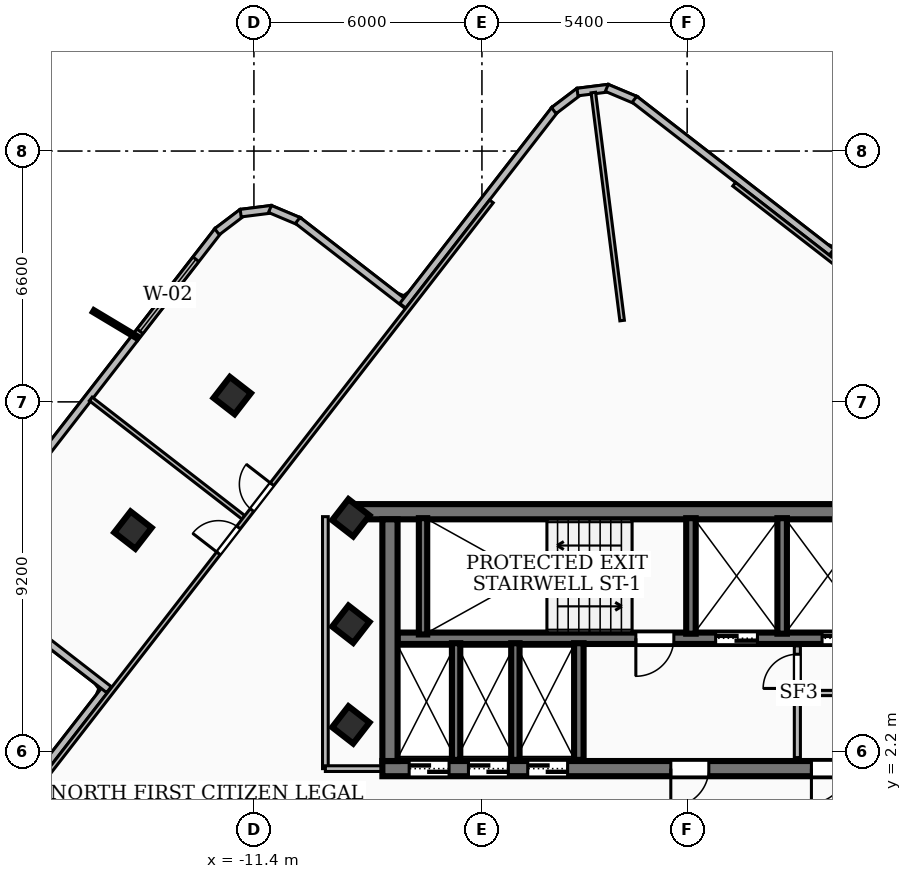
"""IFC4 building model, lengths in metres.
Left out: names, types, materials, properties, quantities, classifications, styles, units other than length and angle.
Written with IfcOpenShell. Run it as: python <this file> out.ifc"""

import sys

from ifc_helpers import new_model, si_unit, direction, frame, frame_2d, origin, origin_2d, place, context, subcontext, project, spatial, rectangle, extrude, element, fill, save


model = new_model("IFC4")
c1 = context("Model", 3, precision=1e-05, world=origin(), true_north=direction((0.0, 1.0)))
c2 = subcontext(c1, "Body", "Model", "MODEL_VIEW")
j1 = project(units=[si_unit("LENGTHUNIT", "METRE"), si_unit("PLANEANGLEUNIT", "RADIAN")], contexts=[c1])
p1 = place(None, origin())
s1 = spatial("IfcSite", under=j1, at=p1, CompositionType="ELEMENT")
p2 = place(p1, origin())
s2 = spatial("IfcBuilding", under=s1, at=p2, CompositionType="ELEMENT")
p3 = place(p2, frame((0.0, 0.0, 257.76)))
s3 = spatial("IfcBuildingStorey", under=s2, at=p3, CompositionType="ELEMENT", Elevation=257.76)
p4 = place(p3, frame((-8.78, 8.51, 0.0), z_axis=(0.0, 0.0, 1.0), x_axis=(1.0, 0.0, 0.0)))
e1 = element("IfcWall", 1, at=p4, inside=s3, PredefinedType="SHEAR", context=c2, shape_type="SweptSolid", body=[
    extrude(rectangle(XDim=17.56, YDim=0.4, at=frame_2d((8.78, 0.0))), origin(), (0.0, 0.0, 1.0), 3.16),
])
p5 = place(p3, frame((8.02, 1.75, 0.0), z_axis=(0.0, 0.0, 1.0), x_axis=(-1.0, 0.0, 0.0)))
e2 = element("IfcWall", 2, at=p5, inside=s3, PredefinedType="SHEAR", context=c2, shape_type="SweptSolid", body=[
    extrude(rectangle(XDim=16.04, YDim=0.4, at=frame_2d((8.02, 0.0))), origin(), (0.0, 0.0, 1.0), 3.16),
])
p6 = place(p5, frame((7.45, 0.0, 0.0)))
e3 = element("IfcOpeningElement", 3, at=p6, cuts=e2, PredefinedType="OPENING", context=c2, shape_type="SweptSolid", body=[
    extrude(rectangle(XDim=1.0, YDim=2.1, at=frame_2d((0.5, 1.05))), frame((0.0, 0.21, 0.0), z_axis=(0.0, -1.0, 0.0), x_axis=(1.0, 0.0, 0.0)), (0.0, 0.0, 1.0), 0.42),
])
p7 = place(p5, frame((14.285, 0.0, 0.0)))
e4 = element("IfcOpeningElement", 4, at=p7, cuts=e2, PredefinedType="OPENING", context=c2, shape_type="SweptSolid", body=[
    extrude(rectangle(XDim=1.05, YDim=2.15, at=frame_2d((0.525, 1.075))), frame((0.0, 0.21, 0.0), z_axis=(0.0, -1.0, 0.0), x_axis=(1.0, 0.0, 0.0)), (0.0, 0.0, 1.0), 0.42),
])
p8 = place(p5, frame((12.725, 0.0, 0.0)))
e5 = element("IfcOpeningElement", 5, at=p8, cuts=e2, PredefinedType="OPENING", context=c2, shape_type="SweptSolid", body=[
    extrude(rectangle(XDim=1.05, YDim=2.15, at=frame_2d((0.525, 1.075))), frame((0.0, 0.21, 0.0), z_axis=(0.0, -1.0, 0.0), x_axis=(1.0, 0.0, 0.0)), (0.0, 0.0, 1.0), 0.42),
])
p9 = place(p5, frame((11.165, 0.0, 0.0)))
e6 = element("IfcOpeningElement", 6, at=p9, cuts=e2, PredefinedType="OPENING", context=c2, shape_type="SweptSolid", body=[
    extrude(rectangle(XDim=1.05, YDim=2.15, at=frame_2d((0.525, 1.075))), frame((0.0, 0.21, 0.0), z_axis=(0.0, -1.0, 0.0), x_axis=(1.0, 0.0, 0.0)), (0.0, 0.0, 1.0), 0.42),
])
p10 = place(p5, frame((3.85, 0.0, 0.0)))
e7 = element("IfcOpeningElement", 7, at=p10, cuts=e2, PredefinedType="OPENING", context=c2, shape_type="SweptSolid", body=[
    extrude(rectangle(XDim=0.9, YDim=2.06, at=frame_2d((0.45, 1.03))), frame((0.0, 0.21, 0.0), z_axis=(0.0, -1.0, 0.0), x_axis=(1.0, 0.0, 0.0)), (0.0, 0.0, 1.0), 0.42),
])
p11 = place(p5, frame((2.35, 0.0, 0.0)))
e8 = element("IfcOpeningElement", 8, at=p11, cuts=e2, PredefinedType="OPENING", context=c2, shape_type="SweptSolid", body=[
    extrude(rectangle(XDim=0.9, YDim=2.06, at=frame_2d((0.45, 1.03))), frame((0.0, 0.21, 0.0), z_axis=(0.0, -1.0, 0.0), x_axis=(1.0, 0.0, 0.0)), (0.0, 0.0, 1.0), 0.42),
])
p12 = place(p5, frame((0.8, 0.0, 0.0)))
e9 = element("IfcOpeningElement", 9, at=p12, cuts=e2, PredefinedType="OPENING", context=c2, shape_type="SweptSolid", body=[
    extrude(rectangle(XDim=0.9, YDim=2.06, at=frame_2d((0.45, 1.03))), frame((0.0, 0.21, 0.0), z_axis=(0.0, -1.0, 0.0), x_axis=(1.0, 0.0, 0.0)), (0.0, 0.0, 1.0), 0.42),
])
p13 = place(p3, frame((-7.82, 1.95, 0.0), z_axis=(0.0, 0.0, 1.0), x_axis=(0.0, 1.0, 0.0)))
e10 = element("IfcWall", 10, at=p13, inside=s3, PredefinedType="SHEAR", context=c2, shape_type="SweptSolid", body=[
    extrude(rectangle(XDim=6.36, YDim=0.4, at=frame_2d((3.18, 0.0))), origin(), (0.0, 0.0, 1.0), 3.16),
])
p14 = place(p3, frame((7.62, 5.18, 0.0), z_axis=(0.0, 0.0, 1.0), x_axis=(-1.0, 0.0, 0.0)))
e11 = element("IfcWall", 11, at=p14, inside=s3, PredefinedType="SOLIDWALL", context=c2, shape_type="SweptSolid", body=[
    extrude(rectangle(XDim=15.24, YDim=0.3, at=frame_2d((7.62, 0.0))), origin(), (0.0, 0.0, 1.0), 3.16),
])
p15 = place(p14, frame((5.77, 0.0, 0.0)))
e12 = element("IfcOpeningElement", 12, at=p15, cuts=e11, PredefinedType="OPENING", context=c2, shape_type="SweptSolid", body=[
    extrude(rectangle(XDim=1.1, YDim=2.15, at=frame_2d((0.55, 1.075))), frame((0.0, 0.16, 0.0), z_axis=(0.0, -1.0, 0.0), x_axis=(1.0, 0.0, 0.0)), (0.0, 0.0, 1.0), 0.32),
])
p16 = place(p14, frame((2.97, 0.0, 0.0)))
e13 = element("IfcOpeningElement", 13, at=p16, cuts=e11, PredefinedType="OPENING", context=c2, shape_type="SweptSolid", body=[
    extrude(rectangle(XDim=1.1, YDim=2.15, at=frame_2d((0.55, 1.075))), frame((0.0, 0.16, 0.0), z_axis=(0.0, -1.0, 0.0), x_axis=(1.0, 0.0, 0.0)), (0.0, 0.0, 1.0), 0.32),
])
p17 = place(p14, frame((7.97, 0.0, 0.0)))
e14 = element("IfcOpeningElement", 14, at=p17, cuts=e11, PredefinedType="OPENING", context=c2, shape_type="SweptSolid", body=[
    extrude(rectangle(XDim=1.0, YDim=2.1, at=frame_2d((0.5, 1.05))), frame((0.0, 0.16, 0.0), z_axis=(0.0, -1.0, 0.0), x_axis=(1.0, 0.0, 0.0)), (0.0, 0.0, 1.0), 0.32),
])
p18 = place(p3, frame((-6.95, 5.28, 0.0), z_axis=(0.0, 0.0, 1.0), x_axis=(0.0, 1.0, 0.0)))
e15 = element("IfcWall", 15, at=p18, inside=s3, PredefinedType="SOLIDWALL", context=c2, shape_type="SweptSolid", body=[
    extrude(rectangle(XDim=3.06, YDim=0.22, at=frame_2d((1.53, 0.0))), origin(), (0.0, 0.0, 1.0), 3.16),
])
for number, where, z_axis, x_axis in (
    (16, (0.1, 5.3, 0.0), (0.0, 0.0, 1.0), (0.0, 1.0, 0.0)),
    (17, (2.5, 5.3, 0.0), (0.0, 0.0, 1.0), (0.0, 1.0, 0.0)),
):
    element("IfcWall", number, at=place(p3, frame(where, z_axis=z_axis, x_axis=x_axis)), inside=s3, PredefinedType="SOLIDWALL", context=c2, shape_type="SweptSolid", body=[
        extrude(rectangle(XDim=3.04, YDim=0.25, at=frame_2d((1.52, 0.0))), origin(), (0.0, 0.0, 1.0), 3.16),
    ])
p19 = place(p3, frame((-2.85, 1.98, 0.0), z_axis=(0.0, 0.0, 1.0), x_axis=(0.0, 1.0, 0.0)))
e18 = element("IfcWall", 18, at=p19, inside=s3, PredefinedType="SOLIDWALL", context=c2, shape_type="SweptSolid", body=[
    extrude(rectangle(XDim=3.07, YDim=0.25, at=frame_2d((1.535, 0.0))), origin(), (0.0, 0.0, 1.0), 3.16),
])
for number, where, z_axis, x_axis in (
    (19, (-6.08, 1.98, 0.0), (0.0, 0.0, 1.0), (0.0, 1.0, 0.0)),
    (20, (-4.52, 1.98, 0.0), (0.0, 0.0, 1.0), (0.0, 1.0, 0.0)),
):
    element("IfcWall", number, at=place(p3, frame(where, z_axis=z_axis, x_axis=x_axis)), inside=s3, PredefinedType="SOLIDWALL", context=c2, shape_type="SweptSolid", body=[
        extrude(rectangle(XDim=3.07, YDim=0.22, at=frame_2d((1.535, 0.0))), origin(), (0.0, 0.0, 1.0), 3.16),
    ])
for number, where, z_axis, x_axis in (
    (21, (-8.85, 2.9, 0.0), (0.0, 0.0, 1.0), (0.613, 0.79, 0.0)),
    (22, (-8.85, 5.55, 0.0), (0.0, 0.0, 1.0), (0.613, 0.79, 0.0)),
    (23, (-8.85, 8.35, 0.0), (0.0, 0.0, 1.0), (0.613, 0.79, 0.0)),
    (24, (-11.971, 11.566, 0.0), (0.0, 0.0, 1.0), (0.613, 0.79, 0.0)),
    (25, (-14.583, 8.026, 0.0), (0.0, 0.0, 1.0), (0.613, 0.79, 0.0)),
):
    element("IfcColumn", number, at=place(p3, frame(where, z_axis=z_axis, x_axis=x_axis)), inside=s3, PredefinedType="COLUMN", context=c2, shape_type="SweptSolid", body=[
        extrude(rectangle(XDim=0.7, YDim=0.7, at=origin_2d()), origin(), (0.0, 0.0, 1.0), 3.42),
    ])
p20 = place(p3, frame((-19.362, -1.386, 0.0), z_axis=(0.0, 0.0, 1.0), x_axis=(0.613007625303, 0.790076990755, 0.0)))
e26 = element("IfcWall", 26, at=p20, inside=s3, PredefinedType="SOLIDWALL", context=c2, shape_type="SweptSolid", body=[
    extrude(rectangle(XDim=6.742, YDim=0.2, at=frame_2d((3.371, 0.0))), origin(), (0.0, 0.0, 1.0), 3.16),
])
p21 = place(p3, frame((-15.215, 3.829, 0.0), z_axis=(0.0, 0.0, 1.0), x_axis=(-0.790311198889, 0.612705646221, 0.0)))
e27 = element("IfcWall", 27, at=p21, inside=s3, PredefinedType="SOLIDWALL", context=c2, shape_type="SweptSolid", body=[
    extrude(rectangle(XDim=3.643, YDim=0.2, at=frame_2d((1.821, 0.0))), origin(), (0.0, 0.0, 1.0), 3.16),
])
p22 = place(p3, frame((-18.357, 8.149, 0.0), z_axis=(0.0, 0.0, 1.0), x_axis=(0.612797548915, 0.790239940806, 0.0)))
e28 = element("IfcWall", 28, at=p22, inside=s3, PredefinedType="SOLIDWALL", context=c2, shape_type="SweptSolid", body=[
    extrude(rectangle(XDim=9.824, YDim=0.2, at=frame_2d((4.912, 0.0))), origin(), (0.0, 0.0, 1.0), 3.16),
])
p23 = place(p22, frame((6.462, 0.0, 0.85)))
e29 = element("IfcOpeningElement", 29, at=p23, cuts=e28, PredefinedType="OPENING", context=c2, shape_type="SweptSolid", body=[
    extrude(rectangle(XDim=2.4, YDim=2.1, at=frame_2d((1.2, 1.05))), frame((0.0, 0.11, 0.0), z_axis=(0.0, -1.0, 0.0), x_axis=(1.0, 0.0, 0.0)), (0.0, 0.0, 1.0), 0.22),
])
p24 = place(p3, frame((-12.372, 15.877, 0.0), z_axis=(0.0, 0.0, 1.0), x_axis=(0.796493049564, 0.60464768419, 0.0)))
e30 = element("IfcWall", 30, at=p24, inside=s3, PredefinedType="SOLIDWALL", context=c2, shape_type="SweptSolid", body=[
    extrude(rectangle(XDim=0.839, YDim=0.2, at=frame_2d((0.419, 0.0))), origin(), (0.0, 0.0, 1.0), 3.16),
])
p25 = place(p3, frame((-11.749, 16.366, 0.0), z_axis=(0.0, 0.0, 1.0), x_axis=(0.992182038023, 0.124799052175, 0.0)))
e31 = element("IfcWall", 31, at=p25, inside=s3, PredefinedType="SOLIDWALL", context=c2, shape_type="SweptSolid", body=[
    extrude(rectangle(XDim=0.825, YDim=0.2, at=frame_2d((0.413, 0.0))), origin(), (0.0, 0.0, 1.0), 3.16),
])
p26 = place(p3, frame((-10.978, 16.476, 0.0), z_axis=(0.0, 0.0, 1.0), x_axis=(0.921328331513, -0.388785423532, 0.0)))
e32 = element("IfcWall", 32, at=p26, inside=s3, PredefinedType="SOLIDWALL", context=c2, shape_type="SweptSolid", body=[
    extrude(rectangle(XDim=0.839, YDim=0.2, at=frame_2d((0.419, 0.0))), origin(), (0.0, 0.0, 1.0), 3.16),
])
p27 = place(p3, frame((-10.248, 16.175, 0.0), z_axis=(0.0, 0.0, 1.0), x_axis=(0.790239683444, -0.612797880797, 0.0)))
e33 = element("IfcWall", 33, at=p27, inside=s3, PredefinedType="SOLIDWALL", context=c2, shape_type="SweptSolid", body=[
    extrude(rectangle(XDim=3.641, YDim=0.2, at=frame_2d((1.82, 0.0))), origin(), (0.0, 0.0, 1.0), 3.16),
])
p28 = place(p3, frame((-7.483, 13.93, 0.0), z_axis=(0.0, 0.0, 1.0), x_axis=(0.612826373036, 0.790217588081, 0.0)))
e34 = element("IfcWall", 34, at=p28, inside=s3, PredefinedType="SOLIDWALL", context=c2, shape_type="SweptSolid", body=[
    extrude(rectangle(XDim=6.542, YDim=0.2, at=frame_2d((3.271, 0.0))), origin(), (0.0, 0.0, 1.0), 3.16),
])
p29 = place(p3, frame((-3.509, 19.064, 0.0), z_axis=(0.0, 0.0, 1.0), x_axis=(0.797053904317, 0.603908166539, 0.0)))
e35 = element("IfcWall", 35, at=p29, inside=s3, PredefinedType="SOLIDWALL", context=c2, shape_type="SweptSolid", body=[
    extrude(rectangle(XDim=0.838, YDim=0.2, at=frame_2d((0.419, 0.0))), origin(), (0.0, 0.0, 1.0), 3.16),
])
p30 = place(p3, frame((-2.886, 19.552, 0.0), z_axis=(0.0, 0.0, 1.0), x_axis=(0.992182038023, 0.124799052175, 0.0)))
e36 = element("IfcWall", 36, at=p30, inside=s3, PredefinedType="SOLIDWALL", context=c2, shape_type="SweptSolid", body=[
    extrude(rectangle(XDim=0.825, YDim=0.2, at=frame_2d((0.413, 0.0))), origin(), (0.0, 0.0, 1.0), 3.16),
])
p31 = place(p3, frame((-2.115, 19.662, 0.0), z_axis=(0.0, 0.0, 1.0), x_axis=(0.921569528133, -0.388213349612, 0.0)))
e37 = element("IfcWall", 37, at=p31, inside=s3, PredefinedType="SOLIDWALL", context=c2, shape_type="SweptSolid", body=[
    extrude(rectangle(XDim=0.838, YDim=0.2, at=frame_2d((0.419, 0.0))), origin(), (0.0, 0.0, 1.0), 3.16),
])
p32 = place(p3, frame((-1.386, 19.362, 0.0), z_axis=(0.0, 0.0, 1.0), x_axis=(0.790076990755, -0.613007625303, 0.0)))
e38 = element("IfcWall", 38, at=p32, inside=s3, PredefinedType="SOLIDWALL", context=c2, shape_type="SweptSolid", body=[
    extrude(rectangle(XDim=6.742, YDim=0.2, at=frame_2d((3.371, 0.0))), origin(), (0.0, 0.0, 1.0), 3.16),
])
p33 = place(p3, frame((3.829, 15.215, 0.0), z_axis=(0.0, 0.0, 1.0), x_axis=(0.612910709336, 0.790152176724, 0.0)))
e39 = element("IfcWall", 39, at=p33, inside=s3, PredefinedType="SOLIDWALL", context=c2, shape_type="SweptSolid", body=[
    extrude(rectangle(XDim=8.243, YDim=0.2, at=frame_2d((4.121, 0.0))), origin(), (0.0, 0.0, 1.0), 3.16),
])
p34 = place(p33, frame((3.35, 0.0, 0.85)))
e40 = element("IfcOpeningElement", 40, at=p34, cuts=e39, PredefinedType="OPENING", context=c2, shape_type="SweptSolid", body=[
    extrude(rectangle(XDim=2.4, YDim=2.1, at=frame_2d((1.2, 1.05))), frame((0.0, 0.11, 0.0), z_axis=(0.0, -1.0, 0.0), x_axis=(1.0, 0.0, 0.0)), (0.0, 0.0, 1.0), 0.22),
])
p35 = place(p3, frame((2.9, 2.04, 0.0), z_axis=(0.0, 0.0, 1.0), x_axis=(0.0, 1.0, 0.0)))
e41 = element("IfcWall", 41, at=p35, inside=s3, PredefinedType="PARTITIONING", context=c2, shape_type="SweptSolid", body=[
    extrude(rectangle(XDim=2.94, YDim=0.16, at=frame_2d((1.47, 0.0))), origin(), (0.0, 0.0, 1.0), 2.39),
])
p36 = place(p35, frame((1.82, 0.0, 0.0)))
e42 = element("IfcOpeningElement", 42, at=p36, cuts=e41, PredefinedType="OPENING", context=c2, shape_type="SweptSolid", body=[
    extrude(rectangle(XDim=0.9, YDim=2.06, at=frame_2d((0.45, 1.03))), frame((0.0, 0.09, 0.0), z_axis=(0.0, -1.0, 0.0), x_axis=(1.0, 0.0, 0.0)), (0.0, 0.0, 1.0), 0.18),
])
p37 = place(p3, frame((2.9, 3.74, 0.0), z_axis=(0.0, 0.0, 1.0), x_axis=(1.0, 0.0, 0.0)))
e43 = element("IfcWall", 43, at=p37, inside=s3, PredefinedType="PARTITIONING", context=c2, shape_type="SweptSolid", body=[
    extrude(rectangle(XDim=4.65, YDim=0.138, at=frame_2d((2.325, 0.0))), origin(), (0.0, 0.0, 1.0), 3.16),
])
p38 = place(p3, frame((-9.52, 1.75, 0.0), z_axis=(0.0, 0.0, 1.0), x_axis=(0.0, 1.0, 0.0)))
e44 = element("IfcWall", 44, at=p38, inside=s3, PredefinedType="PARTITIONING", context=c2, shape_type="SweptSolid", body=[
    extrude(rectangle(XDim=6.63, YDim=0.15, at=frame_2d((3.315, 0.0))), origin(), (0.0, 0.0, 1.0), 2.53),
])
p39 = place(p3, frame((-7.85, 1.75, 0.0), z_axis=(0.0, 0.0, 1.0), x_axis=(-1.0, 0.0, 0.0)))
e45 = element("IfcWall", 45, at=p39, inside=s3, PredefinedType="PARTITIONING", context=c2, shape_type="SweptSolid", body=[
    extrude(rectangle(XDim=1.67, YDim=0.15, at=frame_2d((0.835, 0.0))), origin(), (0.0, 0.0, 1.0), 2.39),
])
p40 = place(p3, frame((-1.711, 13.54, 0.0), z_axis=(0.0, 0.0, 1.0), x_axis=(-0.125366398214, 0.992110511082, 0.0)))
e46 = element("IfcWall", 46, at=p40, inside=s3, PredefinedType="PARTITIONING", context=c2, shape_type="SweptSolid", body=[
    extrude(rectangle(XDim=6.047, YDim=0.12, at=frame_2d((3.023, 0.0))), origin(), (0.0, 0.0, 1.0), 3.16),
])
p41 = place(p3, frame((7.676, 12.131, 0.0), z_axis=(0.0, 0.0, 1.0), x_axis=(-0.790137186805, 0.61293003355, 0.0)))
e47 = element("IfcWall", 47, at=p41, inside=s3, PredefinedType="PARTITIONING", context=c2, shape_type="SweptSolid", body=[
    extrude(rectangle(XDim=8.149, YDim=0.12, at=frame_2d((4.075, 0.0))), origin(), (0.0, 0.0, 1.0), 3.16),
])
p42 = place(p3, frame((-11.676, 8.361, 0.0), z_axis=(0.0, 0.0, 1.0), x_axis=(-0.790227868115, 0.612813117071, 0.0)))
e48 = element("IfcWall", 48, at=p42, inside=s3, PredefinedType="PARTITIONING", context=c2, shape_type="SweptSolid", body=[
    extrude(rectangle(XDim=5.085, YDim=0.12, at=frame_2d((2.542, 0.0))), origin(), (0.0, 0.0, 1.0), 3.16),
])
p43 = place(p3, frame((-17.555, 0.683, 0.0), z_axis=(0.0, 0.0, 1.0), x_axis=(0.61291959311, 0.790145285617, 0.0)))
e49 = element("IfcWall", 49, at=p43, inside=s3, PredefinedType="PARTITIONING", context=c2, shape_type="SweptSolid", body=[
    extrude(rectangle(XDim=20.239, YDim=0.12, at=frame_2d((10.12, 0.0))), origin(), (0.0, 0.0, 1.0), 2.53),
])
p44 = place(p43, frame((9.96, 0.0, 0.0)))
e50 = element("IfcOpeningElement", 50, at=p44, cuts=e49, PredefinedType="OPENING", context=c2, shape_type="SweptSolid", body=[
    extrude(rectangle(XDim=0.86, YDim=2.04, at=frame_2d((0.43, 1.02))), frame((0.0, 0.07, 0.0), z_axis=(0.0, -1.0, 0.0), x_axis=(1.0, 0.0, 0.0)), (0.0, 0.0, 1.0), 0.14),
])
p45 = place(p43, frame((8.52, 0.0, 0.0)))
e51 = element("IfcOpeningElement", 51, at=p45, cuts=e49, PredefinedType="OPENING", context=c2, shape_type="SweptSolid", body=[
    extrude(rectangle(XDim=0.86, YDim=2.04, at=frame_2d((0.43, 1.02))), frame((0.0, 0.07, 0.0), z_axis=(0.0, -1.0, 0.0), x_axis=(1.0, 0.0, 0.0)), (0.0, 0.0, 1.0), 0.14),
])
p46 = place(p23, origin())
e52 = element("IfcWindow", 52, at=p46, inside=s3, PartitioningType="SINGLE_PANEL", PredefinedType="WINDOW", context=c2, shape_type="SweptSolid", body=[
    extrude(rectangle(XDim=2.4, YDim=2.1, at=frame_2d((1.2, 1.05))), frame((0.0, 0.03, 0.0), z_axis=(0.0, -1.0, 0.0), x_axis=(1.0, 0.0, 0.0)), (0.0, 0.0, 1.0), 0.06),
])
fill(e29, e52)
p47 = place(p6, origin())
e53 = element("IfcDoor", 53, at=p47, inside=s3, OperationType="SINGLE_SWING_RIGHT", PredefinedType="DOOR", context=c2, shape_type="SweptSolid", body=[
    extrude(rectangle(XDim=1.0, YDim=2.1, at=frame_2d((0.5, 1.05))), frame((0.0, 0.025, 0.0), z_axis=(0.0, -1.0, 0.0), x_axis=(1.0, 0.0, 0.0)), (0.0, 0.0, 1.0), 0.05),
])
fill(e3, e53)
p48 = place(p15, origin())
e54 = element("IfcDoor", 54, at=p48, inside=s3, OperationType="DOUBLE_DOOR_SLIDING", PredefinedType="DOOR", context=c2, shape_type="SweptSolid", body=[
    extrude(rectangle(XDim=1.1, YDim=2.15, at=frame_2d((0.55, 1.075))), frame((0.0, 0.025, 0.0), z_axis=(0.0, -1.0, 0.0), x_axis=(1.0, 0.0, 0.0)), (0.0, 0.0, 1.0), 0.05),
])
fill(e12, e54)
p49 = place(p16, origin())
e55 = element("IfcDoor", 55, at=p49, inside=s3, OperationType="DOUBLE_DOOR_SLIDING", PredefinedType="DOOR", context=c2, shape_type="SweptSolid", body=[
    extrude(rectangle(XDim=1.1, YDim=2.15, at=frame_2d((0.55, 1.075))), frame((0.0, 0.025, 0.0), z_axis=(0.0, -1.0, 0.0), x_axis=(1.0, 0.0, 0.0)), (0.0, 0.0, 1.0), 0.05),
])
fill(e13, e55)
p50 = place(p17, origin())
e56 = element("IfcDoor", 56, at=p50, inside=s3, OperationType="SINGLE_SWING_RIGHT", PredefinedType="DOOR", context=c2, shape_type="SweptSolid", body=[
    extrude(rectangle(XDim=1.0, YDim=2.1, at=frame_2d((0.5, 1.05))), frame((0.0, 0.025, 0.0), z_axis=(0.0, -1.0, 0.0), x_axis=(1.0, 0.0, 0.0)), (0.0, 0.0, 1.0), 0.05),
])
fill(e14, e56)
p51 = place(p7, origin())
e57 = element("IfcDoor", 57, at=p51, inside=s3, OperationType="DOUBLE_DOOR_SLIDING", PredefinedType="DOOR", context=c2, shape_type="SweptSolid", body=[
    extrude(rectangle(XDim=1.05, YDim=2.15, at=frame_2d((0.525, 1.075))), frame((0.0, 0.025, 0.0), z_axis=(0.0, -1.0, 0.0), x_axis=(1.0, 0.0, 0.0)), (0.0, 0.0, 1.0), 0.05),
])
fill(e4, e57)
p52 = place(p8, origin())
e58 = element("IfcDoor", 58, at=p52, inside=s3, OperationType="DOUBLE_DOOR_SLIDING", PredefinedType="DOOR", context=c2, shape_type="SweptSolid", body=[
    extrude(rectangle(XDim=1.05, YDim=2.15, at=frame_2d((0.525, 1.075))), frame((0.0, 0.025, 0.0), z_axis=(0.0, -1.0, 0.0), x_axis=(1.0, 0.0, 0.0)), (0.0, 0.0, 1.0), 0.05),
])
fill(e5, e58)
p53 = place(p9, origin())
e59 = element("IfcDoor", 59, at=p53, inside=s3, OperationType="DOUBLE_DOOR_SLIDING", PredefinedType="DOOR", context=c2, shape_type="SweptSolid", body=[
    extrude(rectangle(XDim=1.05, YDim=2.15, at=frame_2d((0.525, 1.075))), frame((0.0, 0.025, 0.0), z_axis=(0.0, -1.0, 0.0), x_axis=(1.0, 0.0, 0.0)), (0.0, 0.0, 1.0), 0.05),
])
fill(e6, e59)
p54 = place(p10, origin())
e60 = element("IfcDoor", 60, at=p54, inside=s3, OperationType="SINGLE_SWING_RIGHT", PredefinedType="DOOR", context=c2, shape_type="SweptSolid", body=[
    extrude(rectangle(XDim=0.9, YDim=2.06, at=frame_2d((0.45, 1.03))), frame((0.0, 0.025, 0.0), z_axis=(0.0, -1.0, 0.0), x_axis=(1.0, 0.0, 0.0)), (0.0, 0.0, 1.0), 0.05),
])
fill(e7, e60)
p55 = place(p36, origin())
e61 = element("IfcDoor", 61, at=p55, inside=s3, OperationType="SINGLE_SWING_LEFT", PredefinedType="DOOR", context=c2, shape_type="SweptSolid", body=[
    extrude(rectangle(XDim=0.9, YDim=2.06, at=frame_2d((0.45, 1.03))), frame((0.0, 0.025, 0.0), z_axis=(0.0, -1.0, 0.0), x_axis=(1.0, 0.0, 0.0)), (0.0, 0.0, 1.0), 0.05),
])
fill(e42, e61)
p56 = place(p44, origin())
e62 = element("IfcDoor", 62, at=p56, inside=s3, OperationType="SINGLE_SWING_RIGHT", PredefinedType="DOOR", context=c2, shape_type="SweptSolid", body=[
    extrude(rectangle(XDim=0.86, YDim=2.04, at=frame_2d((0.43, 1.02))), frame((0.0, 0.025, 0.0), z_axis=(0.0, -1.0, 0.0), x_axis=(1.0, 0.0, 0.0)), (0.0, 0.0, 1.0), 0.05),
])
fill(e50, e62)
p57 = place(p45, origin())
e63 = element("IfcDoor", 63, at=p57, inside=s3, OperationType="SINGLE_SWING_LEFT", PredefinedType="DOOR", context=c2, shape_type="SweptSolid", body=[
    extrude(rectangle(XDim=0.86, YDim=2.04, at=frame_2d((0.43, 1.02))), frame((0.0, 0.025, 0.0), z_axis=(0.0, -1.0, 0.0), x_axis=(1.0, 0.0, 0.0)), (0.0, 0.0, 1.0), 0.05),
])
fill(e51, e63)
save(model, sys.argv[1])
